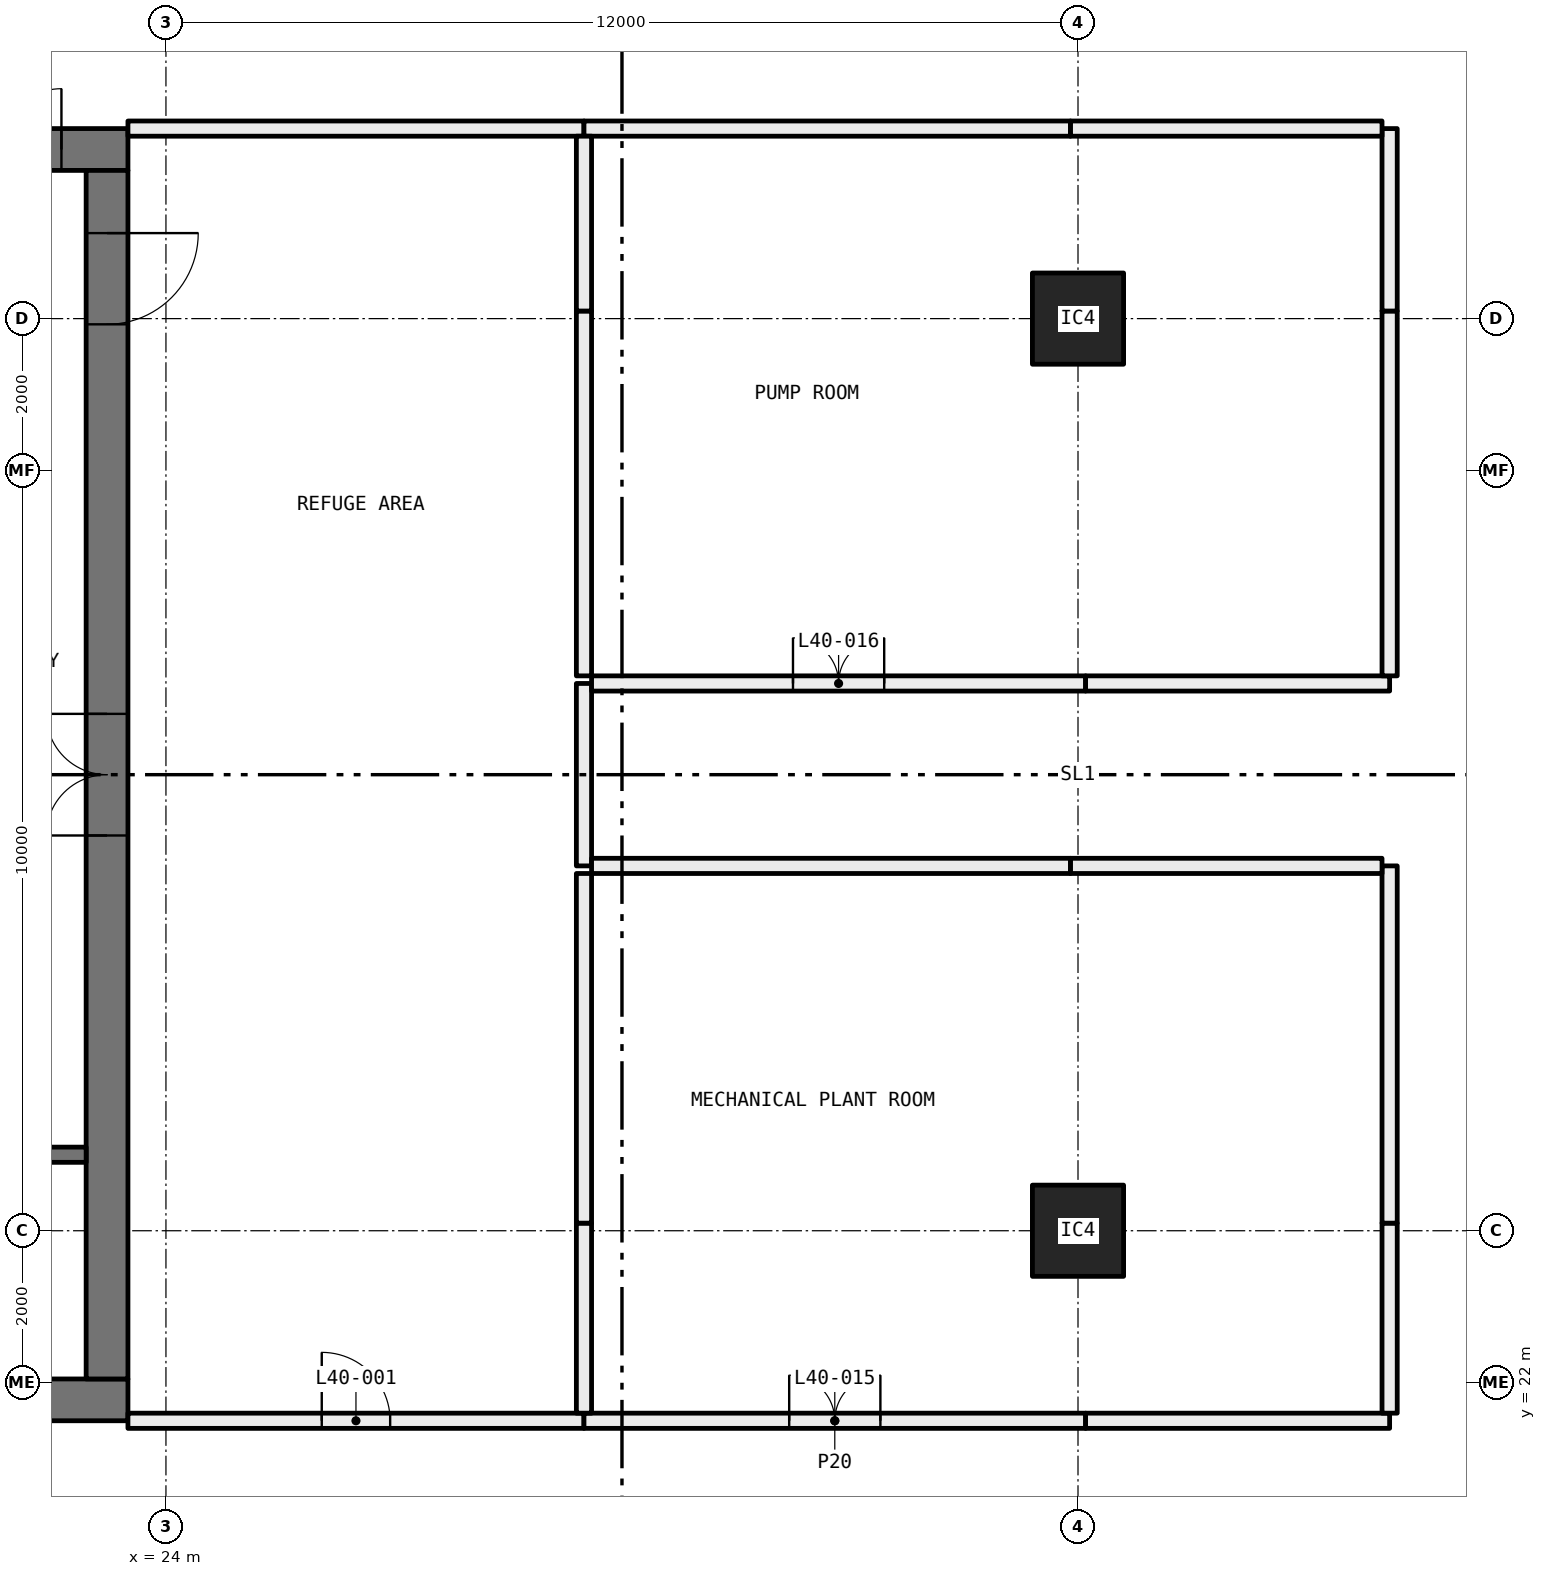
"""IFC4 building model, lengths in metres.
Left out: names, types, materials, properties, quantities, classifications, styles, units other than length and angle.
Written with IfcOpenShell. Run it as: python <this file> out.ifc"""

import sys

from ifc_helpers import new_model, si_unit, direction, frame, frame_2d, origin, origin_2d, place, context, subcontext, project, spatial, rectangle, hollow_rectangle, extrude, element, fill, save


model = new_model("IFC4")
c1 = context("Model", 3, precision=1e-05, world=origin(), true_north=direction((0.0, 1.0)))
c2 = subcontext(c1, "Body", "Model", "MODEL_VIEW")
j1 = project(units=[si_unit("LENGTHUNIT", "METRE"), si_unit("PLANEANGLEUNIT", "RADIAN")], contexts=[c1])
p1 = place(None, origin())
s1 = spatial("IfcSite", under=j1, at=p1, CompositionType="ELEMENT")
p2 = place(p1, origin())
s2 = spatial("IfcBuilding", under=s1, at=p2, CompositionType="ELEMENT")
p3 = place(p2, frame((0.0, 0.0, 153.75)))
s3 = spatial("IfcBuildingStorey", under=s2, at=p3, CompositionType="ELEMENT", Elevation=153.75)
for number, where, z_axis, x_axis in (
    (1, (36.0, 24.0, 0.0), (0.0, 0.0, 1.0), (1.0, 0.0, 0.0)),
    (2, (36.0, 36.0, 0.0), (0.0, 0.0, 1.0), (1.0, 0.0, 0.0)),
):
    element("IfcColumn", number, at=place(p3, frame(where, z_axis=z_axis, x_axis=x_axis)), inside=s3, PredefinedType="COLUMN", context=c2, shape_type="SweptSolid", body=[
        extrude(hollow_rectangle(XDim=1.2, YDim=1.2, WallThickness=0.05, at=origin_2d()), origin(), (0.0, 0.0, 1.0), 4.1),
    ])
p4 = place(p3, frame((23.5, 21.5, 0.0), z_axis=(0.0, 0.0, 1.0), x_axis=(1.0, 0.0, 0.0)))
e3 = element("IfcWall", 3, at=p4, inside=s3, PredefinedType="PARTITIONING", context=c2, shape_type="SweptSolid", body=[
    extrude(rectangle(XDim=6.0, YDim=0.2, at=frame_2d((3.0, 0.0))), origin(), (0.0, 0.0, 1.0), 4.1),
])
p5 = place(p4, frame((2.55, 0.0, 0.0)))
e4 = element("IfcOpeningElement", 4, at=p5, cuts=e3, PredefinedType="OPENING", context=c2, shape_type="SweptSolid", body=[
    extrude(rectangle(XDim=0.9, YDim=2.1, at=frame_2d((0.45, 1.05))), frame((0.0, 0.11, 0.0), z_axis=(0.0, -1.0, 0.0), x_axis=(1.0, 0.0, 0.0)), (0.0, 0.0, 1.0), 0.22),
])
p6 = place(p3, frame((29.5, 38.5, 0.0), z_axis=(0.0, 0.0, 1.0), x_axis=(-1.0, 0.0, 0.0)))
e5 = element("IfcWall", 5, at=p6, inside=s3, PredefinedType="PARTITIONING", context=c2, shape_type="SweptSolid", body=[
    extrude(rectangle(XDim=6.0, YDim=0.2, at=frame_2d((3.0, 0.0))), origin(), (0.0, 0.0, 1.0), 4.1),
])
p7 = place(p3, frame((29.5, 28.8, 0.0), z_axis=(0.0, 0.0, 1.0), x_axis=(0.0, 1.0, 0.0)))
e6 = element("IfcWall", 6, at=p7, inside=s3, PredefinedType="PARTITIONING", context=c2, shape_type="SweptSolid", body=[
    extrude(rectangle(XDim=2.4, YDim=0.2, at=frame_2d((1.2, 0.0))), origin(), (0.0, 0.0, 1.0), 3.6),
])
p8 = place(p3, frame((29.5, 21.5, 0.0), z_axis=(0.0, 0.0, 1.0), x_axis=(1.0, 0.0, 0.0)))
e7 = element("IfcWall", 7, at=p8, inside=s3, PredefinedType="PARTITIONING", context=c2, shape_type="SweptSolid", body=[
    extrude(rectangle(XDim=6.6, YDim=0.2, at=frame_2d((3.3, 0.0))), origin(), (0.0, 0.0, 1.0), 3.5),
])
p9 = place(p8, frame((2.7, 0.0, 0.0)))
e8 = element("IfcOpeningElement", 8, at=p9, cuts=e7, PredefinedType="OPENING", context=c2, shape_type="SweptSolid", body=[
    extrude(rectangle(XDim=1.2, YDim=2.1, at=frame_2d((0.6, 1.05))), frame((0.0, 0.11, 0.0), z_axis=(0.0, -1.0, 0.0), x_axis=(1.0, 0.0, 0.0)), (0.0, 0.0, 1.0), 0.22),
])
p10 = place(p3, frame((36.1, 21.5, 0.0), z_axis=(0.0, 0.0, 1.0), x_axis=(1.0, 0.0, 0.0)))
e9 = element("IfcWall", 9, at=p10, inside=s3, PredefinedType="PARTITIONING", context=c2, shape_type="SweptSolid", body=[
    extrude(rectangle(XDim=4.0, YDim=0.2, at=frame_2d((2.0, 0.0))), origin(), (0.0, 0.0, 1.0), 4.1),
])
p11 = place(p3, frame((40.1, 21.6, 0.0), z_axis=(0.0, 0.0, 1.0), x_axis=(0.0, 1.0, 0.0)))
e10 = element("IfcWall", 10, at=p11, inside=s3, PredefinedType="PARTITIONING", context=c2, shape_type="SweptSolid", body=[
    extrude(rectangle(XDim=2.5, YDim=0.2, at=frame_2d((1.25, 0.0))), origin(), (0.0, 0.0, 1.0), 3.5),
])
p12 = place(p3, frame((40.1, 24.1, 0.0), z_axis=(0.0, 0.0, 1.0), x_axis=(0.0, 1.0, 0.0)))
e11 = element("IfcWall", 11, at=p12, inside=s3, PredefinedType="PARTITIONING", context=c2, shape_type="SweptSolid", body=[
    extrude(rectangle(XDim=4.7, YDim=0.2, at=frame_2d((2.35, 0.0))), origin(), (0.0, 0.0, 1.0), 4.1),
])
p13 = place(p3, frame((40.0, 28.8, 0.0), z_axis=(0.0, 0.0, 1.0), x_axis=(-1.0, 0.0, 0.0)))
e12 = element("IfcWall", 12, at=p13, inside=s3, PredefinedType="PARTITIONING", context=c2, shape_type="SweptSolid", body=[
    extrude(rectangle(XDim=4.1, YDim=0.2, at=frame_2d((2.05, 0.0))), origin(), (0.0, 0.0, 1.0), 3.5),
])
p14 = place(p3, frame((35.9, 28.8, 0.0), z_axis=(0.0, 0.0, 1.0), x_axis=(-1.0, 0.0, 0.0)))
e13 = element("IfcWall", 13, at=p14, inside=s3, PredefinedType="PARTITIONING", context=c2, shape_type="SweptSolid", body=[
    extrude(rectangle(XDim=6.3, YDim=0.2, at=frame_2d((3.15, 0.0))), origin(), (0.0, 0.0, 1.0), 4.1),
])
p15 = place(p3, frame((29.6, 31.2, 0.0), z_axis=(0.0, 0.0, 1.0), x_axis=(1.0, 0.0, 0.0)))
e14 = element("IfcWall", 14, at=p15, inside=s3, PredefinedType="PARTITIONING", context=c2, shape_type="SweptSolid", body=[
    extrude(rectangle(XDim=6.5, YDim=0.2, at=frame_2d((3.25, 0.0))), origin(), (0.0, 0.0, 1.0), 3.5),
])
p16 = place(p15, frame((2.65, 0.0, 0.0)))
e15 = element("IfcOpeningElement", 15, at=p16, cuts=e14, PredefinedType="OPENING", context=c2, shape_type="SweptSolid", body=[
    extrude(rectangle(XDim=1.2, YDim=2.1, at=frame_2d((0.6, 1.05))), frame((0.0, 0.11, 0.0), z_axis=(0.0, -1.0, 0.0), x_axis=(1.0, 0.0, 0.0)), (0.0, 0.0, 1.0), 0.22),
])
p17 = place(p3, frame((36.1, 31.2, 0.0), z_axis=(0.0, 0.0, 1.0), x_axis=(1.0, 0.0, 0.0)))
e16 = element("IfcWall", 16, at=p17, inside=s3, PredefinedType="PARTITIONING", context=c2, shape_type="SweptSolid", body=[
    extrude(rectangle(XDim=4.0, YDim=0.2, at=frame_2d((2.0, 0.0))), origin(), (0.0, 0.0, 1.0), 4.1),
])
p18 = place(p3, frame((40.1, 31.3, 0.0), z_axis=(0.0, 0.0, 1.0), x_axis=(0.0, 1.0, 0.0)))
e17 = element("IfcWall", 17, at=p18, inside=s3, PredefinedType="PARTITIONING", context=c2, shape_type="SweptSolid", body=[
    extrude(rectangle(XDim=4.8, YDim=0.2, at=frame_2d((2.4, 0.0))), origin(), (0.0, 0.0, 1.0), 3.5),
])
p19 = place(p3, frame((40.1, 36.1, 0.0), z_axis=(0.0, 0.0, 1.0), x_axis=(0.0, 1.0, 0.0)))
e18 = element("IfcWall", 18, at=p19, inside=s3, PredefinedType="PARTITIONING", context=c2, shape_type="SweptSolid", body=[
    extrude(rectangle(XDim=2.4, YDim=0.2, at=frame_2d((1.2, 0.0))), origin(), (0.0, 0.0, 1.0), 4.1),
])
p20 = place(p3, frame((40.0, 38.5, 0.0), z_axis=(0.0, 0.0, 1.0), x_axis=(-1.0, 0.0, 0.0)))
e19 = element("IfcWall", 19, at=p20, inside=s3, PredefinedType="PARTITIONING", context=c2, shape_type="SweptSolid", body=[
    extrude(rectangle(XDim=4.1, YDim=0.2, at=frame_2d((2.05, 0.0))), origin(), (0.0, 0.0, 1.0), 3.5),
])
p21 = place(p3, frame((35.9, 38.5, 0.0), z_axis=(0.0, 0.0, 1.0), x_axis=(-1.0, 0.0, 0.0)))
e20 = element("IfcWall", 20, at=p21, inside=s3, PredefinedType="PARTITIONING", context=c2, shape_type="SweptSolid", body=[
    extrude(rectangle(XDim=6.4, YDim=0.2, at=frame_2d((3.2, 0.0))), origin(), (0.0, 0.0, 1.0), 4.1),
])
p22 = place(p3, frame((29.5, 21.6, 0.0), z_axis=(0.0, 0.0, 1.0), x_axis=(0.0, 1.0, 0.0)))
e21 = element("IfcWall", 21, at=p22, inside=s3, PredefinedType="PARTITIONING", context=c2, shape_type="SweptSolid", body=[
    extrude(rectangle(XDim=2.5, YDim=0.2, at=frame_2d((1.25, 0.0))), origin(), (0.0, 0.0, 1.0), 3.5),
])
p23 = place(p3, frame((29.5, 24.1, 0.0), z_axis=(0.0, 0.0, 1.0), x_axis=(0.0, 1.0, 0.0)))
e22 = element("IfcWall", 22, at=p23, inside=s3, PredefinedType="PARTITIONING", context=c2, shape_type="SweptSolid", body=[
    extrude(rectangle(XDim=4.6, YDim=0.2, at=frame_2d((2.3, 0.0))), origin(), (0.0, 0.0, 1.0), 3.6),
])
p24 = place(p3, frame((29.5, 31.3, 0.0), z_axis=(0.0, 0.0, 1.0), x_axis=(0.0, 1.0, 0.0)))
e23 = element("IfcWall", 23, at=p24, inside=s3, PredefinedType="PARTITIONING", context=c2, shape_type="SweptSolid", body=[
    extrude(rectangle(XDim=4.8, YDim=0.2, at=frame_2d((2.4, 0.0))), origin(), (0.0, 0.0, 1.0), 3.5),
])
p25 = place(p3, frame((29.5, 36.1, 0.0), z_axis=(0.0, 0.0, 1.0), x_axis=(0.0, 1.0, 0.0)))
e24 = element("IfcWall", 24, at=p25, inside=s3, PredefinedType="PARTITIONING", context=c2, shape_type="SweptSolid", body=[
    extrude(rectangle(XDim=2.3, YDim=0.2, at=frame_2d((1.15, 0.0))), origin(), (0.0, 0.0, 1.0), 4.1),
])
p26 = place(p3, frame((12.5, 21.775, 0.0), z_axis=(0.0, 0.0, 1.0), x_axis=(1.0, 0.0, 0.0)))
e25 = element("IfcWall", 25, at=p26, inside=s3, PredefinedType="SHEAR", context=c2, shape_type="SweptSolid", body=[
    extrude(rectangle(XDim=11.0, YDim=0.55, at=frame_2d((5.5, 0.0))), origin(), (0.0, 0.0, 1.0), 4.1),
])
p27 = place(p3, frame((12.5, 38.225, 0.0), z_axis=(0.0, 0.0, 1.0), x_axis=(1.0, 0.0, 0.0)))
e26 = element("IfcWall", 26, at=p27, inside=s3, PredefinedType="SHEAR", context=c2, shape_type="SweptSolid", body=[
    extrude(rectangle(XDim=11.0, YDim=0.55, at=frame_2d((5.5, 0.0))), origin(), (0.0, 0.0, 1.0), 4.1),
])
p28 = place(p27, frame((8.525, 0.0, 0.0)))
e27 = element("IfcOpeningElement", 27, at=p28, cuts=e26, PredefinedType="OPENING", context=c2, shape_type="SweptSolid", body=[
    extrude(rectangle(XDim=1.6, YDim=2.1, at=frame_2d((0.8, 1.05))), frame((0.0, 0.285, 0.0), z_axis=(0.0, -1.0, 0.0), x_axis=(1.0, 0.0, 0.0)), (0.0, 0.0, 1.0), 0.57),
])
p29 = place(p3, frame((23.225, 22.05, 0.0), z_axis=(0.0, 0.0, 1.0), x_axis=(0.0, 1.0, 0.0)))
e28 = element("IfcWall", 28, at=p29, inside=s3, PredefinedType="SHEAR", context=c2, shape_type="SweptSolid", body=[
    extrude(rectangle(XDim=15.9, YDim=0.55, at=frame_2d((7.95, 0.0))), origin(), (0.0, 0.0, 1.0), 4.1),
])
p30 = place(p29, frame((7.15, 0.0, 0.0)))
e29 = element("IfcOpeningElement", 29, at=p30, cuts=e28, PredefinedType="OPENING", context=c2, shape_type="SweptSolid", body=[
    extrude(rectangle(XDim=1.6, YDim=2.1, at=frame_2d((0.8, 1.05))), frame((0.0, 0.285, 0.0), z_axis=(0.0, -1.0, 0.0), x_axis=(1.0, 0.0, 0.0)), (0.0, 0.0, 1.0), 0.57),
])
p31 = place(p29, frame((13.875, 0.0, 0.0)))
e30 = element("IfcOpeningElement", 30, at=p31, cuts=e28, PredefinedType="OPENING", context=c2, shape_type="SweptSolid", body=[
    extrude(rectangle(XDim=1.2, YDim=2.1, at=frame_2d((0.6, 1.05))), frame((0.0, 0.285, 0.0), z_axis=(0.0, -1.0, 0.0), x_axis=(1.0, 0.0, 0.0)), (0.0, 0.0, 1.0), 0.57),
])
p32 = place(p3, frame((15.5, 25.0, 0.0), z_axis=(0.0, 0.0, 1.0), x_axis=(1.0, 0.0, 0.0)))
e31 = element("IfcWall", 31, at=p32, inside=s3, PredefinedType="SOLIDWALL", context=c2, shape_type="SweptSolid", body=[
    extrude(rectangle(XDim=7.45, YDim=0.2, at=frame_2d((3.725, 0.0))), origin(), (0.0, 0.0, 1.0), 4.1),
])
p33 = place(p5, origin())
e32 = element("IfcDoor", 32, at=p33, inside=s3, OperationType="SINGLE_SWING_RIGHT", PredefinedType="DOOR", context=c2, shape_type="SweptSolid", body=[
    extrude(rectangle(XDim=0.9, YDim=2.1, at=frame_2d((0.45, 1.05))), frame((0.0, 0.025, 0.0), z_axis=(0.0, -1.0, 0.0), x_axis=(1.0, 0.0, 0.0)), (0.0, 0.0, 1.0), 0.05),
])
fill(e4, e32)
p34 = place(p9, origin())
e33 = element("IfcDoor", 33, at=p34, inside=s3, OperationType="DOUBLE_DOOR_SINGLE_SWING", PredefinedType="DOOR", context=c2, shape_type="SweptSolid", body=[
    extrude(rectangle(XDim=1.2, YDim=2.1, at=frame_2d((0.6, 1.05))), frame((0.0, 0.025, 0.0), z_axis=(0.0, -1.0, 0.0), x_axis=(1.0, 0.0, 0.0)), (0.0, 0.0, 1.0), 0.05),
])
fill(e8, e33)
p35 = place(p16, origin())
e34 = element("IfcDoor", 34, at=p35, inside=s3, OperationType="DOUBLE_DOOR_SINGLE_SWING", PredefinedType="DOOR", context=c2, shape_type="SweptSolid", body=[
    extrude(rectangle(XDim=1.2, YDim=2.1, at=frame_2d((0.6, 1.05))), frame((0.0, 0.025, 0.0), z_axis=(0.0, -1.0, 0.0), x_axis=(1.0, 0.0, 0.0)), (0.0, 0.0, 1.0), 0.05),
])
fill(e15, e34)
p36 = place(p28, origin())
e35 = element("IfcDoor", 35, at=p36, inside=s3, OperationType="DOUBLE_DOOR_SINGLE_SWING", PredefinedType="DOOR", context=c2, shape_type="SweptSolid", body=[
    extrude(rectangle(XDim=1.6, YDim=2.1, at=frame_2d((0.8, 1.05))), frame((0.0, 0.025, 0.0), z_axis=(0.0, -1.0, 0.0), x_axis=(1.0, 0.0, 0.0)), (0.0, 0.0, 1.0), 0.05),
])
fill(e27, e35)
p37 = place(p30, origin())
e36 = element("IfcDoor", 36, at=p37, inside=s3, OperationType="DOUBLE_DOOR_SINGLE_SWING", PredefinedType="DOOR", context=c2, shape_type="SweptSolid", body=[
    extrude(rectangle(XDim=1.6, YDim=2.1, at=frame_2d((0.8, 1.05))), frame((0.0, 0.025, 0.0), z_axis=(0.0, -1.0, 0.0), x_axis=(1.0, 0.0, 0.0)), (0.0, 0.0, 1.0), 0.05),
])
fill(e29, e36)
p38 = place(p31, frame((1.2, 0.0, 0.0), x_axis=(-1.0, 0.0, 0.0)))
e37 = element("IfcDoor", 37, at=p38, inside=s3, OperationType="SINGLE_SWING_RIGHT", PredefinedType="DOOR", context=c2, shape_type="SweptSolid", body=[
    extrude(rectangle(XDim=1.2, YDim=2.1, at=frame_2d((0.6, 1.05))), frame((0.0, 0.025, 0.0), z_axis=(0.0, -1.0, 0.0), x_axis=(1.0, 0.0, 0.0)), (0.0, 0.0, 1.0), 0.05),
])
fill(e30, e37)
save(model, sys.argv[1])
